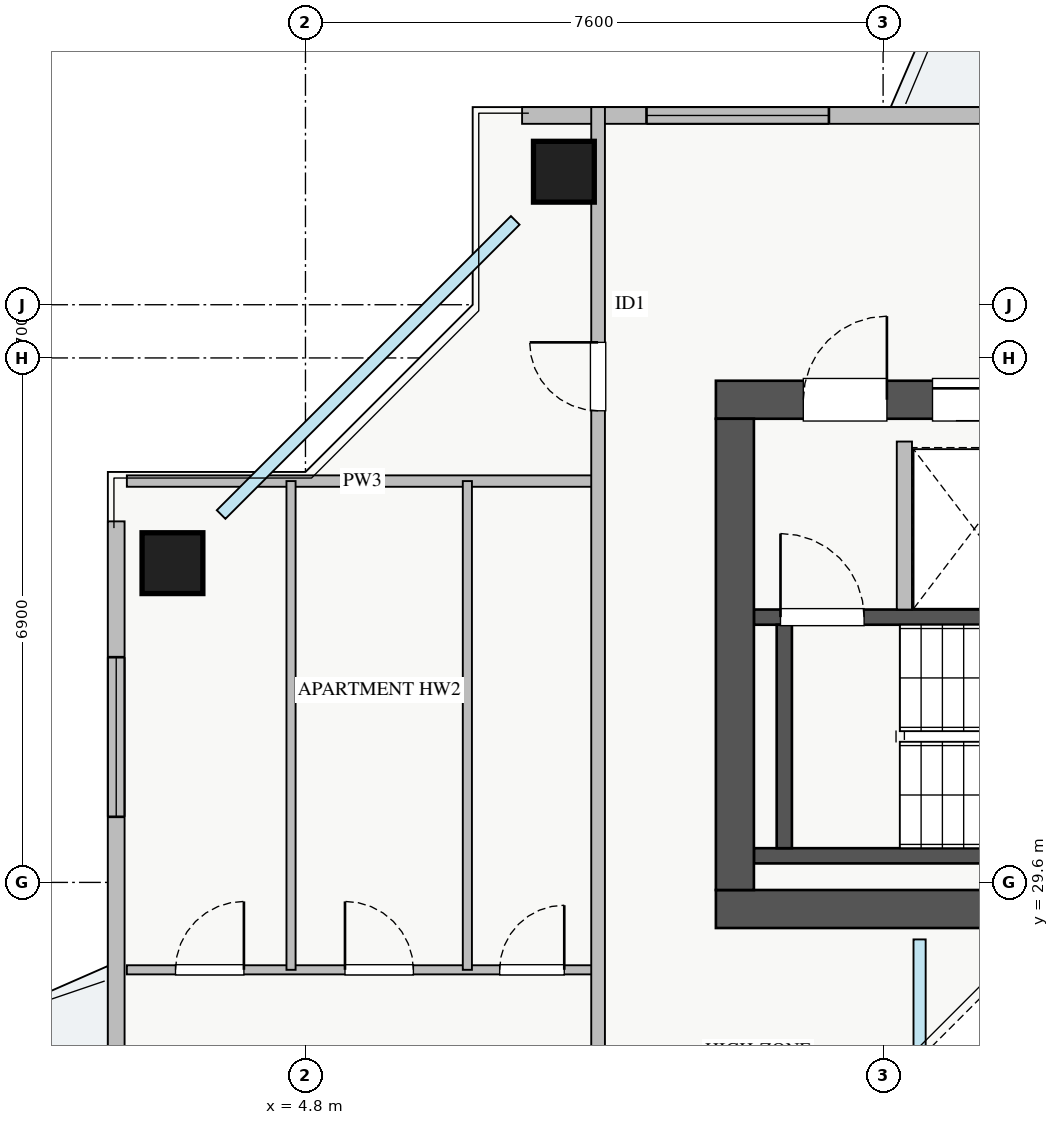
"""IFC4 building model, lengths in metres.
Left out: names, types, materials, properties, quantities, classifications, styles, units other than length and angle.
Written with IfcOpenShell. Run it as: python <this file> out.ifc"""

import sys

from ifc_helpers import new_model, si_unit, direction, frame, frame_2d, origin, origin_2d, place, context, subcontext, project, spatial, rectangle, extrude, source, transform, mapped, element, fill, save


model = new_model("IFC4")
c1 = context("Model", 3, precision=1e-05, world=origin(), true_north=direction((0.0, 1.0)))
c2 = subcontext(c1, "Body", "Model", "MODEL_VIEW")
j1 = project(units=[si_unit("LENGTHUNIT", "METRE"), si_unit("PLANEANGLEUNIT", "RADIAN")], contexts=[c1])
p1 = place(None, origin())
s1 = spatial("IfcSite", under=j1, at=p1, CompositionType="ELEMENT")
p2 = place(p1, origin())
s2 = spatial("IfcBuilding", under=s1, at=p2, CompositionType="ELEMENT")
p3 = place(p2, frame((0.0, 0.0, 197.0)))
s3 = spatial("IfcBuildingStorey", under=s2, at=p3, CompositionType="ELEMENT", Elevation=197.0)
p4 = place(p3, frame((12.68, 33.2, 0.0), z_axis=(0.0, 0.0, 1.0), x_axis=(1.0, 0.0, 0.0)))
e1 = element("IfcWall", 1, at=p4, inside=s3, PredefinedType="SHEAR", context=c2, shape_type="SweptSolid", body=[
    extrude(rectangle(XDim=1.94, YDim=0.18, at=frame_2d((0.97, 0.0))), origin(), (0.0, 0.0, 1.0), 3.07),
])
p5 = place(p3, frame((10.7, 29.95, 0.0), z_axis=(0.0, 0.0, 1.0), x_axis=(1.0, 0.0, 0.0)))
e2 = element("IfcWall", 2, at=p5, inside=s3, PredefinedType="SHEAR", context=c2, shape_type="SweptSolid", body=[
    extrude(rectangle(XDim=7.45, YDim=0.2, at=frame_2d((3.725, 0.0))), origin(), (0.0, 0.0, 1.0), 3.25),
])
p6 = place(p3, frame((10.7, 33.09, 0.0), z_axis=(0.0, 0.0, 1.0), x_axis=(1.0, 0.0, 0.0)))
e3 = element("IfcWall", 3, at=p6, inside=s3, PredefinedType="SHEAR", context=c2, shape_type="SweptSolid", body=[
    extrude(rectangle(XDim=7.45, YDim=0.2, at=frame_2d((3.725, 0.0))), origin(), (0.0, 0.0, 1.0), 3.25),
])
p7 = place(p6, frame((0.35, 0.0, 0.0)))
e4 = element("IfcOpeningElement", 4, at=p7, cuts=e3, PredefinedType="OPENING", context=c2, shape_type="SweptSolid", body=[
    extrude(rectangle(XDim=1.1, YDim=2.05, at=frame_2d((0.55, 1.025))), frame((0.0, 0.11, 0.0), z_axis=(0.0, -1.0, 0.0), x_axis=(1.0, 0.0, 0.0)), (0.0, 0.0, 1.0), 0.22),
])
p8 = place(p3, frame((11.1, 30.05, 0.0), z_axis=(0.0, 0.0, 1.0), x_axis=(0.0, 1.0, 0.0)))
e5 = element("IfcWall", 5, at=p8, inside=s3, PredefinedType="SHEAR", context=c2, shape_type="SweptSolid", body=[
    extrude(rectangle(XDim=2.94, YDim=0.2, at=frame_2d((1.47, 0.0))), origin(), (0.0, 0.0, 1.0), 3.25),
])
p9 = place(p3, frame((10.2, 29.25, 0.0), z_axis=(0.0, 0.0, 1.0), x_axis=(1.0, 0.0, 0.0)))
e6 = element("IfcWall", 6, at=p9, inside=s3, PredefinedType="SHEAR", context=c2, shape_type="SweptSolid", body=[
    extrude(rectangle(XDim=17.6, YDim=0.5, at=frame_2d((8.8, 0.0))), origin(), (0.0, 0.0, 1.0), 3.25),
])
p10 = place(p3, frame((10.2, 35.95, 0.0), z_axis=(0.0, 0.0, 1.0), x_axis=(1.0, 0.0, 0.0)))
e7 = element("IfcWall", 7, at=p10, inside=s3, PredefinedType="SHEAR", context=c2, shape_type="SweptSolid", body=[
    extrude(rectangle(XDim=17.6, YDim=0.5, at=frame_2d((8.8, 0.0))), origin(), (0.0, 0.0, 1.0), 3.25),
])
p11 = place(p10, frame((1.15, 0.0, 0.0)))
e8 = element("IfcOpeningElement", 8, at=p11, cuts=e7, PredefinedType="OPENING", context=c2, shape_type="SweptSolid", body=[
    extrude(rectangle(XDim=1.1, YDim=2.05, at=frame_2d((0.55, 1.025))), frame((0.0, 0.26, 0.0), z_axis=(0.0, -1.0, 0.0), x_axis=(1.0, 0.0, 0.0)), (0.0, 0.0, 1.0), 0.52),
])
p12 = place(p10, frame((8.3, 0.0, 0.0)))
e9 = element("IfcOpeningElement", 9, at=p12, cuts=e7, PredefinedType="OPENING", context=c2, shape_type="SweptSolid", body=[
    extrude(rectangle(XDim=1.1, YDim=2.05, at=frame_2d((0.55, 1.025))), frame((0.0, 0.26, 0.0), z_axis=(0.0, -1.0, 0.0), x_axis=(1.0, 0.0, 0.0)), (0.0, 0.0, 1.0), 0.52),
])
p13 = place(p10, frame((2.85, 0.0, 0.0)))
e10 = element("IfcOpeningElement", 10, at=p13, cuts=e7, PredefinedType="OPENING", context=c2, shape_type="SweptSolid", body=[
    extrude(rectangle(XDim=1.1, YDim=2.05, at=frame_2d((0.55, 1.025))), frame((0.0, 0.26, 0.0), z_axis=(0.0, -1.0, 0.0), x_axis=(1.0, 0.0, 0.0)), (0.0, 0.0, 1.0), 0.52),
])
p14 = place(p10, frame((5.8, 0.0, 0.0)))
e11 = element("IfcOpeningElement", 11, at=p14, cuts=e7, PredefinedType="OPENING", context=c2, shape_type="SweptSolid", body=[
    extrude(rectangle(XDim=1.0, YDim=2.05, at=frame_2d((0.5, 1.025))), frame((0.0, 0.26, 0.0), z_axis=(0.0, -1.0, 0.0), x_axis=(1.0, 0.0, 0.0)), (0.0, 0.0, 1.0), 0.52),
])
p15 = place(p10, frame((14.74, 0.0, 0.0)))
e12 = element("IfcOpeningElement", 12, at=p15, cuts=e7, PredefinedType="OPENING", context=c2, shape_type="SweptSolid", body=[
    extrude(rectangle(XDim=1.0, YDim=2.05, at=frame_2d((0.5, 1.025))), frame((0.0, 0.26, 0.0), z_axis=(0.0, -1.0, 0.0), x_axis=(1.0, 0.0, 0.0)), (0.0, 0.0, 1.0), 0.52),
])
p16 = place(p10, frame((10.175, 0.0, 0.0)))
e13 = element("IfcOpeningElement", 13, at=p16, cuts=e7, PredefinedType="OPENING", context=c2, shape_type="SweptSolid", body=[
    extrude(rectangle(XDim=1.0, YDim=2.05, at=frame_2d((0.5, 1.025))), frame((0.0, 0.26, 0.0), z_axis=(0.0, -1.0, 0.0), x_axis=(1.0, 0.0, 0.0)), (0.0, 0.0, 1.0), 0.52),
])
p17 = place(p10, frame((12.625, 0.0, 0.0)))
e14 = element("IfcOpeningElement", 14, at=p17, cuts=e7, PredefinedType="OPENING", context=c2, shape_type="SweptSolid", body=[
    extrude(rectangle(XDim=1.0, YDim=2.05, at=frame_2d((0.5, 1.025))), frame((0.0, 0.26, 0.0), z_axis=(0.0, -1.0, 0.0), x_axis=(1.0, 0.0, 0.0)), (0.0, 0.0, 1.0), 0.52),
])
p18 = place(p3, frame((10.45, 29.5, 0.0), z_axis=(0.0, 0.0, 1.0), x_axis=(0.0, 1.0, 0.0)))
e15 = element("IfcWall", 15, at=p18, inside=s3, PredefinedType="SHEAR", context=c2, shape_type="SweptSolid", body=[
    extrude(rectangle(XDim=6.2, YDim=0.5, at=frame_2d((3.1, 0.0))), origin(), (0.0, 0.0, 1.0), 3.25),
])
m1 = source(origin(), c2, "Body", "SweptSolid", [
    extrude(rectangle(XDim=0.8, YDim=0.8, at=origin_2d()), origin(), (0.0, 0.0, 1.0), 3.25),
])
for number, where, z_axis, x_axis in (
    (16, (8.2, 38.95, 0.0), (0.0, 0.0, 1.0), (1.0, 0.0, 0.0)),
    (17, (3.05, 33.8, 0.0), (0.0, 0.0, 1.0), (1.0, 0.0, 0.0)),
):
    element("IfcColumn", number, at=place(p3, frame(where, z_axis=z_axis, x_axis=x_axis)), inside=s3, PredefinedType="COLUMN", context=c2, shape_type="MappedRepresentation", body=[
        mapped(m1, transform((0.0, 0.0, 0.0), x_axis=(1.0, 0.0, 0.0), y_axis=(0.0, 1.0, 0.0), z_axis=(0.0, 0.0, 1.0), scale=1.0)),
    ])
p19 = place(p3, frame((7.65, 39.69, 0.0), z_axis=(0.0, 0.0, 1.0), x_axis=(1.0, 0.0, 0.0)))
e18 = element("IfcWall", 18, at=p19, inside=s3, PredefinedType="STANDARD", context=c2, shape_type="SweptSolid", body=[
    extrude(rectangle(XDim=22.7, YDim=0.22, at=frame_2d((11.35, 0.0))), origin(), (0.0, 0.0, 1.0), 2.61),
])
p20 = place(p19, frame((12.2, 0.0, 0.0)))
e19 = element("IfcOpeningElement", 19, at=p20, cuts=e18, PredefinedType="OPENING", context=c2, shape_type="SweptSolid", body=[
    extrude(rectangle(XDim=1.2, YDim=2.1, at=frame_2d((0.6, 1.05))), frame((0.0, 0.12, 0.0), z_axis=(0.0, -1.0, 0.0), x_axis=(1.0, 0.0, 0.0)), (0.0, 0.0, 1.0), 0.24),
])
p21 = place(p19, frame((1.637, 0.0, 0.9)))
e20 = element("IfcOpeningElement", 20, at=p21, cuts=e18, PredefinedType="OPENING", context=c2, shape_type="SweptSolid", body=[
    extrude(rectangle(XDim=2.4, YDim=1.48, at=frame_2d((1.2, 0.74))), frame((0.0, 0.12, 0.0), z_axis=(0.0, -1.0, 0.0), x_axis=(1.0, 0.0, 0.0)), (0.0, 0.0, 1.0), 0.24),
])
p22 = place(p19, frame((7.612, 0.0, 0.9)))
e21 = element("IfcOpeningElement", 21, at=p22, cuts=e18, PredefinedType="OPENING", context=c2, shape_type="SweptSolid", body=[
    extrude(rectangle(XDim=1.8, YDim=1.45, at=frame_2d((0.9, 0.725))), frame((0.0, 0.12, 0.0), z_axis=(0.0, -1.0, 0.0), x_axis=(1.0, 0.0, 0.0)), (0.0, 0.0, 1.0), 0.24),
])
p23 = place(p19, frame((18.812, 0.0, 0.9)))
e22 = element("IfcOpeningElement", 22, at=p23, cuts=e18, PredefinedType="OPENING", context=c2, shape_type="SweptSolid", body=[
    extrude(rectangle(XDim=2.1, YDim=1.48, at=frame_2d((1.05, 0.74))), frame((0.0, 0.12, 0.0), z_axis=(0.0, -1.0, 0.0), x_axis=(1.0, 0.0, 0.0)), (0.0, 0.0, 1.0), 0.24),
])
p24 = place(p3, frame((2.31, 11.65, 0.0), z_axis=(0.0, 0.0, 1.0), x_axis=(0.0, 1.0, 0.0)))
e23 = element("IfcWall", 23, at=p24, inside=s3, PredefinedType="STANDARD", context=c2, shape_type="SweptSolid", body=[
    extrude(rectangle(XDim=22.7, YDim=0.22, at=frame_2d((11.35, 0.0))), origin(), (0.0, 0.0, 1.0), 2.61),
])
p25 = place(p24, frame((12.2, 0.0, 0.0)))
e24 = element("IfcOpeningElement", 24, at=p25, cuts=e23, PredefinedType="OPENING", context=c2, shape_type="SweptSolid", body=[
    extrude(rectangle(XDim=1.2, YDim=2.1, at=frame_2d((0.6, 1.05))), frame((0.0, 0.12, 0.0), z_axis=(0.0, -1.0, 0.0), x_axis=(1.0, 0.0, 0.0)), (0.0, 0.0, 1.0), 0.24),
])
p26 = place(p24, frame((1.638, 0.0, 0.9)))
e25 = element("IfcOpeningElement", 25, at=p26, cuts=e23, PredefinedType="OPENING", context=c2, shape_type="SweptSolid", body=[
    extrude(rectangle(XDim=2.4, YDim=1.48, at=frame_2d((1.2, 0.74))), frame((0.0, 0.12, 0.0), z_axis=(0.0, -1.0, 0.0), x_axis=(1.0, 0.0, 0.0)), (0.0, 0.0, 1.0), 0.24),
])
p27 = place(p24, frame((18.813, 0.0, 0.9)))
e26 = element("IfcOpeningElement", 26, at=p27, cuts=e23, PredefinedType="OPENING", context=c2, shape_type="SweptSolid", body=[
    extrude(rectangle(XDim=2.1, YDim=1.48, at=frame_2d((1.05, 0.74))), frame((0.0, 0.12, 0.0), z_axis=(0.0, -1.0, 0.0), x_axis=(1.0, 0.0, 0.0)), (0.0, 0.0, 1.0), 0.24),
])
p28 = place(p24, frame((5.16, 0.0, 0.9)))
e27 = element("IfcOpeningElement", 27, at=p28, cuts=e23, PredefinedType="OPENING", context=c2, shape_type="SweptSolid", body=[
    extrude(rectangle(XDim=0.9, YDim=1.2, at=frame_2d((0.45, 0.6))), frame((0.0, 0.12, 0.0), z_axis=(0.0, -1.0, 0.0), x_axis=(1.0, 0.0, 0.0)), (0.0, 0.0, 1.0), 0.24),
])
p29 = place(p24, frame((13.62, 0.0, 0.9)))
e28 = element("IfcOpeningElement", 28, at=p29, cuts=e23, PredefinedType="OPENING", context=c2, shape_type="SweptSolid", body=[
    extrude(rectangle(XDim=0.9, YDim=1.2, at=frame_2d((0.45, 0.6))), frame((0.0, 0.12, 0.0), z_axis=(0.0, -1.0, 0.0), x_axis=(1.0, 0.0, 0.0)), (0.0, 0.0, 1.0), 0.24),
])
p30 = place(p3, frame((12.68, 33.19, 0.0), z_axis=(0.0, 0.0, 1.0), x_axis=(0.0, 1.0, 0.0)))
e29 = element("IfcWall", 29, at=p30, inside=s3, PredefinedType="PARTITIONING", context=c2, shape_type="SweptSolid", body=[
    extrude(rectangle(XDim=2.21, YDim=0.2, at=frame_2d((1.105, 0.0))), origin(), (0.0, 0.0, 1.0), 3.07),
])
p31 = place(p3, frame((2.45, 34.88, 0.0), z_axis=(0.0, 0.0, 1.0), x_axis=(1.0, 0.0, 0.0)))
e30 = element("IfcWall", 30, at=p31, inside=s3, PredefinedType="PARTITIONING", context=c2, shape_type="SweptSolid", body=[
    extrude(rectangle(XDim=6.2, YDim=0.15, at=frame_2d((3.1, 0.0))), origin(), (0.0, 0.0, 1.0), 3.07),
])
p32 = place(p3, frame((2.45, 28.45, 0.0), z_axis=(0.0, 0.0, 1.0), x_axis=(1.0, 0.0, 0.0)))
e31 = element("IfcWall", 31, at=p32, inside=s3, PredefinedType="PLUMBINGWALL", context=c2, shape_type="SweptSolid", body=[
    extrude(rectangle(XDim=6.2, YDim=0.12, at=frame_2d((3.1, 0.0))), origin(), (0.0, 0.0, 1.0), 3.07),
])
p33 = place(p32, frame((0.64, 0.0, 0.0)))
e32 = element("IfcOpeningElement", 32, at=p33, cuts=e31, PredefinedType="OPENING", context=c2, shape_type="SweptSolid", body=[
    extrude(rectangle(XDim=0.9, YDim=2.05, at=frame_2d((0.45, 1.025))), frame((0.0, 0.07, 0.0), z_axis=(0.0, -1.0, 0.0), x_axis=(1.0, 0.0, 0.0)), (0.0, 0.0, 1.0), 0.14),
])
p34 = place(p32, frame((2.87, 0.0, 0.0)))
e33 = element("IfcOpeningElement", 33, at=p34, cuts=e31, PredefinedType="OPENING", context=c2, shape_type="SweptSolid", body=[
    extrude(rectangle(XDim=0.9, YDim=2.05, at=frame_2d((0.45, 1.025))), frame((0.0, 0.07, 0.0), z_axis=(0.0, -1.0, 0.0), x_axis=(1.0, 0.0, 0.0)), (0.0, 0.0, 1.0), 0.14),
])
p35 = place(p32, frame((4.905, 0.0, 0.0)))
e34 = element("IfcOpeningElement", 34, at=p35, cuts=e31, PredefinedType="OPENING", context=c2, shape_type="SweptSolid", body=[
    extrude(rectangle(XDim=0.85, YDim=2.05, at=frame_2d((0.425, 1.025))), frame((0.0, 0.07, 0.0), z_axis=(0.0, -1.0, 0.0), x_axis=(1.0, 0.0, 0.0)), (0.0, 0.0, 1.0), 0.14),
])
for number, where, z_axis, x_axis in (
    (35, (4.61, 28.45, 0.0), (0.0, 0.0, 1.0), (0.0, 1.0, 0.0)),
    (36, (6.93, 28.45, 0.0), (0.0, 0.0, 1.0), (0.0, 1.0, 0.0)),
):
    element("IfcWall", number, at=place(p3, frame(where, z_axis=z_axis, x_axis=x_axis)), inside=s3, PredefinedType="PLUMBINGWALL", context=c2, shape_type="SweptSolid", body=[
        extrude(rectangle(XDim=6.43, YDim=0.12, at=frame_2d((3.215, 0.0))), origin(), (0.0, 0.0, 1.0), 3.07),
    ])
p36 = place(p3, frame((8.65, 6.2, 0.0), z_axis=(0.0, 0.0, 1.0), x_axis=(0.0, 1.0, 0.0)))
e37 = element("IfcWall", 37, at=p36, inside=s3, PredefinedType="PARTITIONING", context=c2, shape_type="SweptSolid", body=[
    extrude(rectangle(XDim=33.6, YDim=0.18, at=frame_2d((16.8, 0.0))), origin(), (0.0, 0.0, 1.0), 3.07),
])
p37 = place(p36, frame((29.605, 0.0, 0.0)))
e38 = element("IfcOpeningElement", 38, at=p37, cuts=e37, PredefinedType="OPENING", context=c2, shape_type="SweptSolid", body=[
    extrude(rectangle(XDim=0.9, YDim=2.05, at=frame_2d((0.45, 1.025))), frame((0.0, 0.1, 0.0), z_axis=(0.0, -1.0, 0.0), x_axis=(1.0, 0.0, 0.0)), (0.0, 0.0, 1.0), 0.2),
])
p38 = place(p36, frame((2.92, 0.0, 0.0)))
e39 = element("IfcOpeningElement", 39, at=p38, cuts=e37, PredefinedType="OPENING", context=c2, shape_type="SweptSolid", body=[
    extrude(rectangle(XDim=0.9, YDim=2.05, at=frame_2d((0.45, 1.025))), frame((0.0, 0.1, 0.0), z_axis=(0.0, -1.0, 0.0), x_axis=(1.0, 0.0, 0.0)), (0.0, 0.0, 1.0), 0.2),
])
p39 = place(p36, frame((6.965, 0.0, 0.0)))
e40 = element("IfcOpeningElement", 40, at=p39, cuts=e37, PredefinedType="OPENING", context=c2, shape_type="SweptSolid", body=[
    extrude(rectangle(XDim=1.0, YDim=2.05, at=frame_2d((0.5, 1.025))), frame((0.0, 0.1, 0.0), z_axis=(0.0, -1.0, 0.0), x_axis=(1.0, 0.0, 0.0)), (0.0, 0.0, 1.0), 0.2),
])
p40 = place(p36, frame((18.595, 0.0, 0.0)))
e41 = element("IfcOpeningElement", 41, at=p40, cuts=e37, PredefinedType="OPENING", context=c2, shape_type="SweptSolid", body=[
    extrude(rectangle(XDim=1.0, YDim=2.05, at=frame_2d((0.5, 1.025))), frame((0.0, 0.1, 0.0), z_axis=(0.0, -1.0, 0.0), x_axis=(1.0, 0.0, 0.0)), (0.0, 0.0, 1.0), 0.2),
])
m2 = source(origin(), c2, "Body", "SweptSolid", [
    extrude(rectangle(XDim=2.4, YDim=1.48, at=frame_2d((1.2, 0.74))), frame((0.0, 0.03, 0.0), z_axis=(0.0, -1.0, 0.0), x_axis=(1.0, 0.0, 0.0)), (0.0, 0.0, 1.0), 0.06),
])
p41 = place(p21, origin())
e42 = element("IfcWindow", 42, at=p41, inside=s3, PartitioningType="TRIPLE_PANEL_VERTICAL", PredefinedType="WINDOW", context=c2, shape_type="MappedRepresentation", body=[
    mapped(m2, transform((0.0, 0.0, 0.0), x_axis=(1.0, 0.0, 0.0), y_axis=(0.0, 1.0, 0.0), z_axis=(0.0, 0.0, 1.0), scale=1.0)),
])
fill(e20, e42)
m3 = source(origin(), c2, "Body", "SweptSolid", [
    extrude(rectangle(XDim=2.1, YDim=1.48, at=frame_2d((1.05, 0.74))), frame((0.0, 0.03, 0.0), z_axis=(0.0, -1.0, 0.0), x_axis=(1.0, 0.0, 0.0)), (0.0, 0.0, 1.0), 0.06),
])
p42 = place(p27, origin())
e43 = element("IfcWindow", 43, at=p42, inside=s3, PartitioningType="TRIPLE_PANEL_VERTICAL", PredefinedType="WINDOW", context=c2, shape_type="MappedRepresentation", body=[
    mapped(m3, transform((0.0, 0.0, 0.0), x_axis=(1.0, 0.0, 0.0), y_axis=(0.0, 1.0, 0.0), z_axis=(0.0, 0.0, 1.0), scale=1.0)),
])
fill(e26, e43)
m4 = source(origin(), c2, "Body", "SweptSolid", [
    extrude(rectangle(XDim=1.1, YDim=2.05, at=frame_2d((0.55, 1.025))), frame((0.0, 0.025, 0.0), z_axis=(0.0, -1.0, 0.0), x_axis=(1.0, 0.0, 0.0)), (0.0, 0.0, 1.0), 0.05),
])
p43 = place(p11, origin())
e44 = element("IfcDoor", 44, at=p43, inside=s3, OperationType="SINGLE_SWING_RIGHT", PredefinedType="DOOR", context=c2, shape_type="MappedRepresentation", body=[
    mapped(m4, transform((0.0, 0.0, 0.0), x_axis=(1.0, 0.0, 0.0), y_axis=(0.0, 1.0, 0.0), z_axis=(0.0, 0.0, 1.0), scale=1.0)),
])
fill(e8, e44)
p44 = place(p7, origin())
e45 = element("IfcDoor", 45, at=p44, inside=s3, OperationType="SINGLE_SWING_LEFT", PredefinedType="DOOR", context=c2, shape_type="MappedRepresentation", body=[
    mapped(m4, transform((0.0, 0.0, 0.0), x_axis=(1.0, 0.0, 0.0), y_axis=(0.0, 1.0, 0.0), z_axis=(0.0, 0.0, 1.0), scale=1.0)),
])
fill(e4, e45)
p45 = place(p13, origin())
e46 = element("IfcDoor", 46, at=p45, inside=s3, OperationType="SLIDING_TO_LEFT", PredefinedType="DOOR", context=c2, shape_type="MappedRepresentation", body=[
    mapped(m4, transform((0.0, 0.0, 0.0), x_axis=(1.0, 0.0, 0.0), y_axis=(0.0, 1.0, 0.0), z_axis=(0.0, 0.0, 1.0), scale=1.0)),
])
fill(e10, e46)
m5 = source(origin(), c2, "Body", "SweptSolid", [
    extrude(rectangle(XDim=0.9, YDim=2.05, at=frame_2d((0.45, 1.025))), frame((0.0, 0.025, 0.0), z_axis=(0.0, -1.0, 0.0), x_axis=(1.0, 0.0, 0.0)), (0.0, 0.0, 1.0), 0.05),
])
p46 = place(p33, origin())
e47 = element("IfcDoor", 47, at=p46, inside=s3, OperationType="SINGLE_SWING_RIGHT", PredefinedType="DOOR", context=c2, shape_type="MappedRepresentation", body=[
    mapped(m5, transform((0.0, 0.0, 0.0), x_axis=(1.0, 0.0, 0.0), y_axis=(0.0, 1.0, 0.0), z_axis=(0.0, 0.0, 1.0), scale=1.0)),
])
fill(e32, e47)
p47 = place(p34, origin())
e48 = element("IfcDoor", 48, at=p47, inside=s3, OperationType="SINGLE_SWING_LEFT", PredefinedType="DOOR", context=c2, shape_type="MappedRepresentation", body=[
    mapped(m5, transform((0.0, 0.0, 0.0), x_axis=(1.0, 0.0, 0.0), y_axis=(0.0, 1.0, 0.0), z_axis=(0.0, 0.0, 1.0), scale=1.0)),
])
fill(e33, e48)
m6 = source(origin(), c2, "Body", "SweptSolid", [
    extrude(rectangle(XDim=0.85, YDim=2.05, at=frame_2d((0.425, 1.025))), frame((0.0, 0.025, 0.0), z_axis=(0.0, -1.0, 0.0), x_axis=(1.0, 0.0, 0.0)), (0.0, 0.0, 1.0), 0.05),
])
p48 = place(p35, origin())
e49 = element("IfcDoor", 49, at=p48, inside=s3, OperationType="SINGLE_SWING_RIGHT", PredefinedType="DOOR", context=c2, shape_type="MappedRepresentation", body=[
    mapped(m6, transform((0.0, 0.0, 0.0), x_axis=(1.0, 0.0, 0.0), y_axis=(0.0, 1.0, 0.0), z_axis=(0.0, 0.0, 1.0), scale=1.0)),
])
fill(e34, e49)
p49 = place(p37, origin())
e50 = element("IfcDoor", 50, at=p49, inside=s3, OperationType="SINGLE_SWING_RIGHT", PredefinedType="DOOR", context=c2, shape_type="MappedRepresentation", body=[
    mapped(m5, transform((0.0, 0.0, 0.0), x_axis=(1.0, 0.0, 0.0), y_axis=(0.0, 1.0, 0.0), z_axis=(0.0, 0.0, 1.0), scale=1.0)),
])
fill(e38, e50)
save(model, sys.argv[1])
